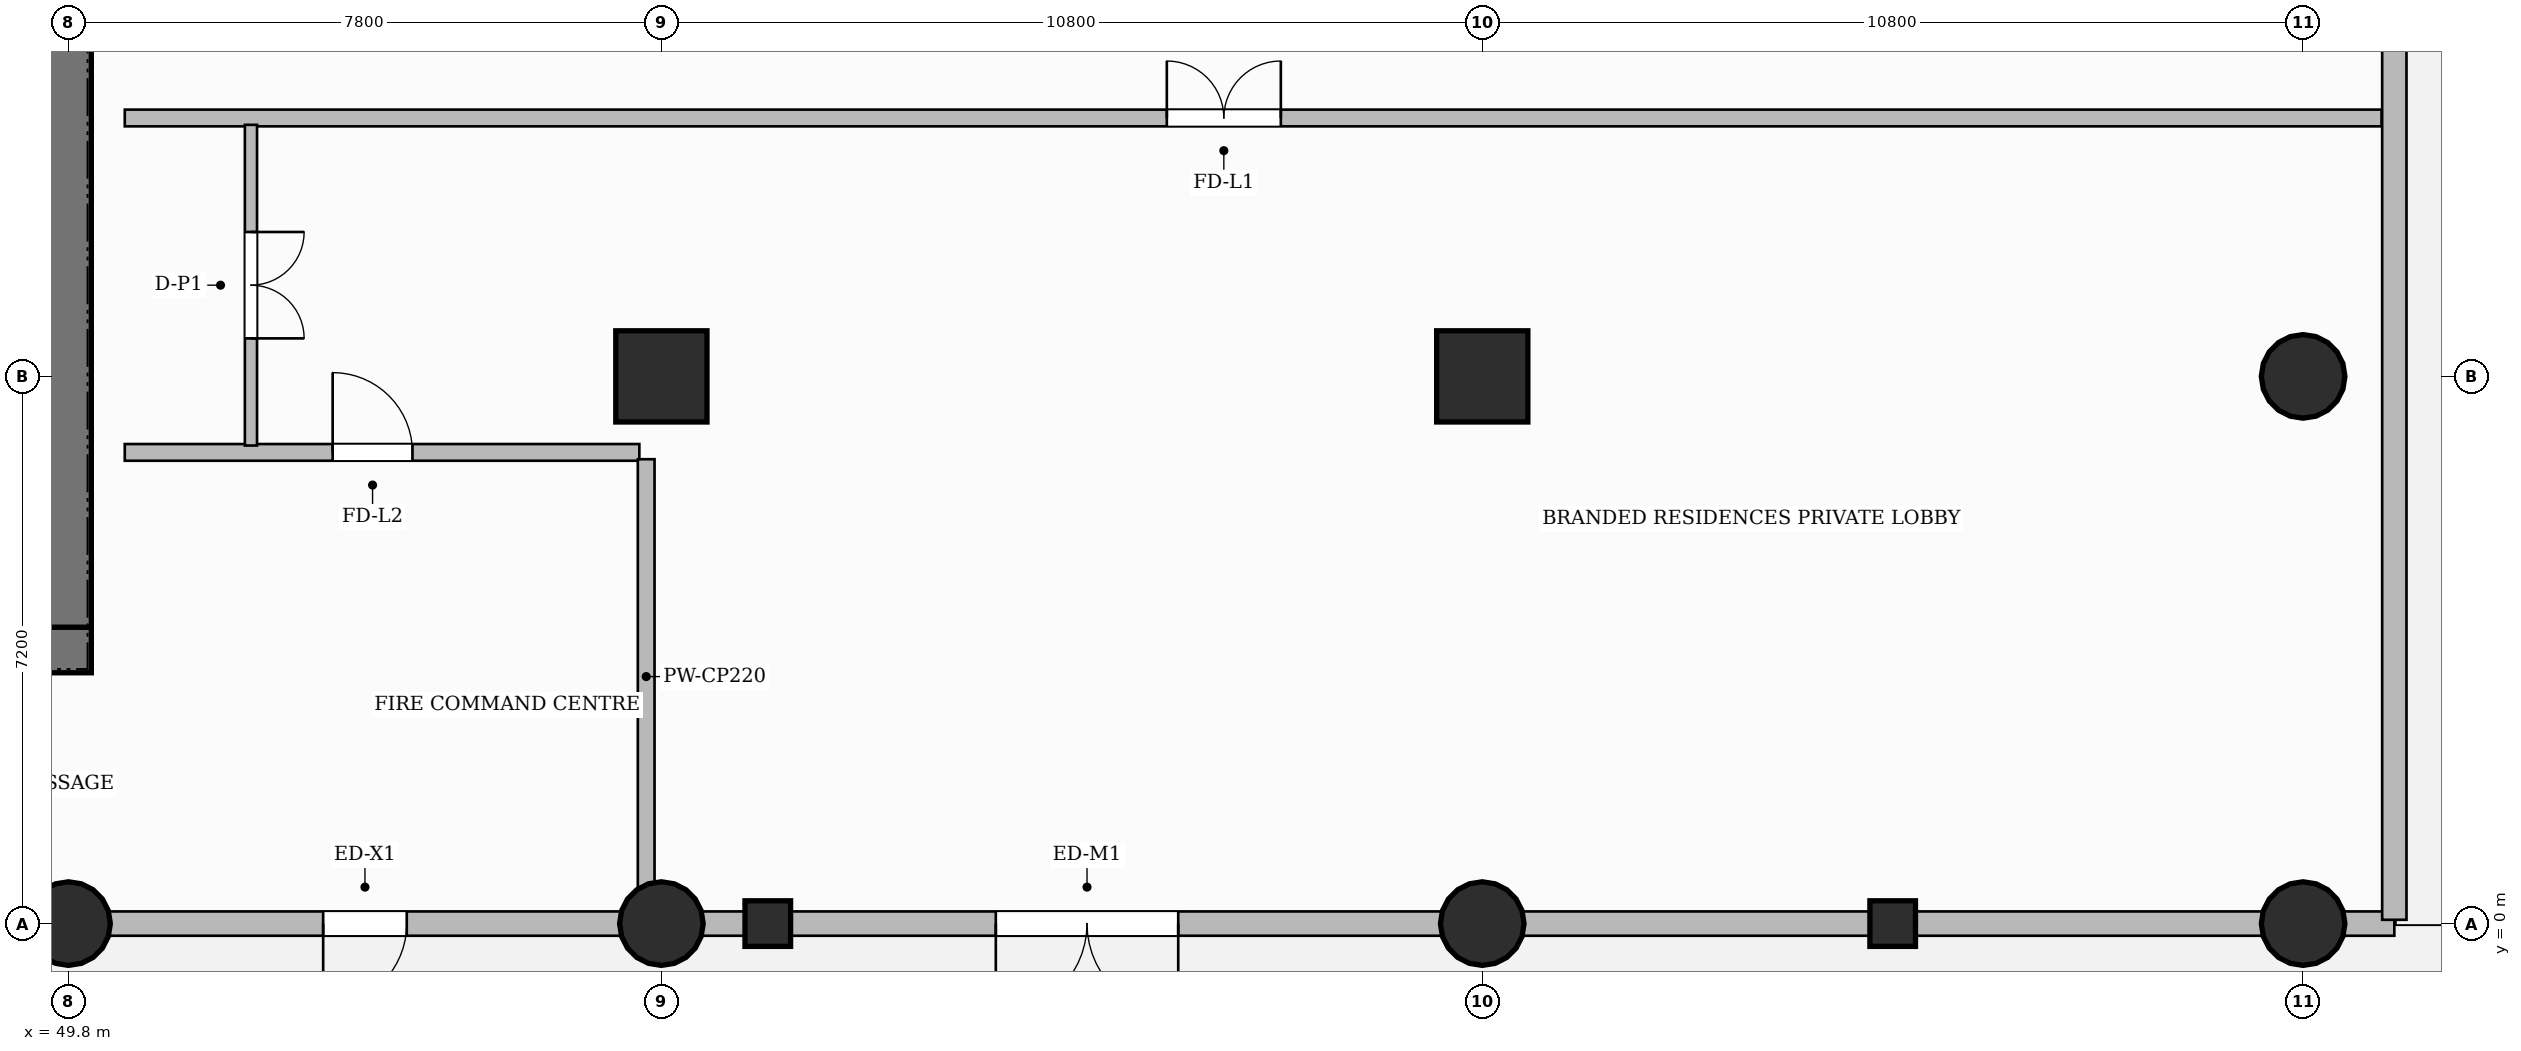
"""IFC4 building model, lengths in metres.
Left out: names, types, materials, properties, quantities, classifications, styles, units other than length and angle.
Written with IfcOpenShell. Run it as: python <this file> out.ifc"""

import sys

from ifc_helpers import new_model, si_unit, direction, frame, frame_2d, origin, origin_2d, place, context, subcontext, project, spatial, rectangle, circle, extrude, source, transform, mapped, element, fill, save


model = new_model("IFC4")
c1 = context("Model", 3, precision=1e-05, world=origin(), true_north=direction((0.0, 1.0)))
c2 = subcontext(c1, "Body", "Model", "MODEL_VIEW")
j1 = project(units=[si_unit("LENGTHUNIT", "METRE"), si_unit("PLANEANGLEUNIT", "RADIAN")], contexts=[c1])
p1 = place(None, origin())
s1 = spatial("IfcSite", under=j1, at=p1, CompositionType="ELEMENT")
p2 = place(p1, origin())
s2 = spatial("IfcBuilding", under=s1, at=p2, CompositionType="ELEMENT")
p3 = place(p2, origin())
s3 = spatial("IfcBuildingStorey", under=s2, at=p3, CompositionType="ELEMENT", Elevation=0.0)
p4 = place(p3, frame((34.5, 3.6, 0.0), z_axis=(0.0, 0.0, 1.0), x_axis=(1.0, 0.0, 0.0)))
e1 = element("IfcWall", 1, at=p4, inside=s3, PredefinedType="SHEAR", context=c2, shape_type="SweptSolid", body=[
    extrude(rectangle(XDim=15.6, YDim=0.6, at=frame_2d((7.8, 0.0))), origin(), (0.0, 0.0, 1.0), 5.4),
])
p5 = place(p4, frame((4.77, 0.0, 0.0)))
e2 = element("IfcOpeningElement", 2, at=p5, cuts=e1, PredefinedType="OPENING", context=c2, shape_type="SweptSolid", body=[
    extrude(rectangle(XDim=0.9, YDim=2.1, at=frame_2d((0.45, 1.05))), frame((0.0, 0.31, 0.0), z_axis=(0.0, -1.0, 0.0), x_axis=(1.0, 0.0, 0.0)), (0.0, 0.0, 1.0), 0.62),
])
p6 = place(p4, frame((7.15, 0.0, 0.0)))
e3 = element("IfcOpeningElement", 3, at=p6, cuts=e1, PredefinedType="OPENING", context=c2, shape_type="SweptSolid", body=[
    extrude(rectangle(XDim=0.9, YDim=2.1, at=frame_2d((0.45, 1.05))), frame((0.0, 0.31, 0.0), z_axis=(0.0, -1.0, 0.0), x_axis=(1.0, 0.0, 0.0)), (0.0, 0.0, 1.0), 0.62),
])
p7 = place(p3, frame((49.8, 3.9, 0.0), z_axis=(0.0, 0.0, 1.0), x_axis=(0.0, 1.0, 0.0)))
e4 = element("IfcWall", 4, at=p7, inside=s3, PredefinedType="SHEAR", context=c2, shape_type="SweptSolid", body=[
    extrude(rectangle(XDim=10.2, YDim=0.6, at=frame_2d((5.1, 0.0))), origin(), (0.0, 0.0, 1.0), 5.4),
])
p8 = place(p7, frame((8.225, 0.0, 0.0)))
e5 = element("IfcOpeningElement", 5, at=p8, cuts=e4, PredefinedType="OPENING", context=c2, shape_type="SweptSolid", body=[
    extrude(rectangle(XDim=1.05, YDim=2.2, at=frame_2d((0.525, 1.1))), frame((0.0, 0.31, 0.0), z_axis=(0.0, -1.0, 0.0), x_axis=(1.0, 0.0, 0.0)), (0.0, 0.0, 1.0), 0.62),
])
m1 = source(origin(), c2, "Body", "SweptSolid", [
    extrude(circle(Radius=0.55, at=origin_2d()), origin(), (0.0, 0.0, 1.0), 5.4),
])
for number, where, z_axis, x_axis in (
    (6, (49.8, 0.0, 0.0), (0.0, 0.0, 1.0), (1.0, 0.0, 0.0)),
    (7, (57.6, 0.0, 0.0), (0.0, 0.0, 1.0), (1.0, 0.0, 0.0)),
):
    element("IfcColumn", number, at=place(p3, frame(where, z_axis=z_axis, x_axis=x_axis)), inside=s3, PredefinedType="COLUMN", context=c2, shape_type="MappedRepresentation", body=[
        mapped(m1, transform((0.0, 0.0, 0.0), scale=1.0)),
    ])
m2 = source(origin(), c2, "Body", "SweptSolid", [
    extrude(rectangle(XDim=1.2, YDim=1.2, at=origin_2d()), origin(), (0.0, 0.0, 1.0), 5.4),
])
p9 = place(p3, frame((57.6, 7.2, 0.0), z_axis=(0.0, 0.0, 1.0), x_axis=(1.0, 0.0, 0.0)))
e8 = element("IfcColumn", 8, at=p9, inside=s3, PredefinedType="COLUMN", context=c2, shape_type="MappedRepresentation", body=[
    mapped(m2, transform((0.0, 0.0, 0.0), scale=1.0)),
])
p10 = place(p3, frame((68.4, 0.0, 0.0), z_axis=(0.0, 0.0, 1.0), x_axis=(1.0, 0.0, 0.0)))
e9 = element("IfcColumn", 9, at=p10, inside=s3, PredefinedType="COLUMN", context=c2, shape_type="MappedRepresentation", body=[
    mapped(m1, transform((0.0, 0.0, 0.0), scale=1.0)),
])
p11 = place(p3, frame((68.4, 7.2, 0.0), z_axis=(0.0, 0.0, 1.0), x_axis=(1.0, 0.0, 0.0)))
e10 = element("IfcColumn", 10, at=p11, inside=s3, PredefinedType="COLUMN", context=c2, shape_type="MappedRepresentation", body=[
    mapped(m2, transform((0.0, 0.0, 0.0), scale=1.0)),
])
for number, where, z_axis, x_axis in (
    (11, (79.2, 0.0, 0.0), (0.0, 0.0, 1.0), (1.0, 0.0, 0.0)),
    (12, (79.2, 7.2, 0.0), (0.0, 0.0, 1.0), (1.0, 0.0, 0.0)),
):
    element("IfcColumn", number, at=place(p3, frame(where, z_axis=z_axis, x_axis=x_axis)), inside=s3, PredefinedType="COLUMN", context=c2, shape_type="MappedRepresentation", body=[
        mapped(m1, transform((0.0, 0.0, 0.0), scale=1.0)),
    ])
m3 = source(origin(), c2, "Body", "SweptSolid", [
    extrude(rectangle(XDim=0.6, YDim=0.6, at=origin_2d()), origin(), (0.0, 0.0, 1.0), 5.4),
])
for number, where, z_axis, x_axis in (
    (13, (59.0, 0.0, 0.0), (0.0, 0.0, 1.0), (1.0, 0.0, 0.0)),
    (14, (73.8, 0.0, 0.0), (0.0, 0.0, 1.0), (1.0, 0.0, 0.0)),
):
    element("IfcColumn", number, at=place(p3, frame(where, z_axis=z_axis, x_axis=x_axis)), inside=s3, PredefinedType="PILASTER", context=c2, shape_type="MappedRepresentation", body=[
        mapped(m3, transform((0.0, 0.0, 0.0), scale=1.0)),
    ])
p12 = place(p3, frame((50.54, 10.6, 0.0), z_axis=(0.0, 0.0, 1.0), x_axis=(1.0, 0.0, 0.0)))
e15 = element("IfcWall", 15, at=p12, inside=s3, PredefinedType="PARTITIONING", context=c2, shape_type="SweptSolid", body=[
    extrude(rectangle(XDim=29.692, YDim=0.22, at=frame_2d((14.846, 0.0))), origin(), (0.0, 0.0, 1.0), 5.1),
])
p13 = place(p12, frame((13.71, 0.0, 0.0)))
e16 = element("IfcOpeningElement", 16, at=p13, cuts=e15, PredefinedType="OPENING", context=c2, shape_type="SweptSolid", body=[
    extrude(rectangle(XDim=1.5, YDim=2.2, at=frame_2d((0.75, 1.1))), frame((0.0, 0.12, 0.0), z_axis=(0.0, -1.0, 0.0), x_axis=(1.0, 0.0, 0.0)), (0.0, 0.0, 1.0), 0.24),
])
p14 = place(p3, frame((50.54, 6.2, 0.0), z_axis=(0.0, 0.0, 1.0), x_axis=(1.0, 0.0, 0.0)))
e17 = element("IfcWall", 17, at=p14, inside=s3, PredefinedType="PARTITIONING", context=c2, shape_type="SweptSolid", body=[
    extrude(rectangle(XDim=6.77, YDim=0.22, at=frame_2d((3.385, 0.0))), origin(), (0.0, 0.0, 1.0), 5.1),
])
p15 = place(p14, frame((2.735, 0.0, 0.0)))
e18 = element("IfcOpeningElement", 18, at=p15, cuts=e17, PredefinedType="OPENING", context=c2, shape_type="SweptSolid", body=[
    extrude(rectangle(XDim=1.05, YDim=2.15, at=frame_2d((0.525, 1.075))), frame((0.0, 0.12, 0.0), z_axis=(0.0, -1.0, 0.0), x_axis=(1.0, 0.0, 0.0)), (0.0, 0.0, 1.0), 0.24),
])
p16 = place(p3, frame((57.4, 0.39, 0.0), z_axis=(0.0, 0.0, 1.0), x_axis=(0.0, 1.0, 0.0)))
e19 = element("IfcWall", 19, at=p16, inside=s3, PredefinedType="PARTITIONING", context=c2, shape_type="SweptSolid", body=[
    extrude(rectangle(XDim=5.72, YDim=0.22, at=frame_2d((2.86, 0.0))), origin(), (0.0, 0.0, 1.0), 4.085),
])
p17 = place(p3, frame((52.2, 10.51, 0.0), z_axis=(0.0, 0.0, 1.0), x_axis=(0.0, -1.0, 0.0)))
e20 = element("IfcWall", 20, at=p17, inside=s3, PredefinedType="PARTITIONING", context=c2, shape_type="SweptSolid", body=[
    extrude(rectangle(XDim=4.22, YDim=0.16, at=frame_2d((2.11, 0.0))), origin(), (0.0, 0.0, 1.0), 5.1),
])
p18 = place(p17, frame((1.41, 0.0, 0.0)))
e21 = element("IfcOpeningElement", 21, at=p18, cuts=e20, PredefinedType="OPENING", context=c2, shape_type="SweptSolid", body=[
    extrude(rectangle(XDim=1.4, YDim=2.35, at=frame_2d((0.7, 1.175))), frame((0.0, 0.09, 0.0), z_axis=(0.0, -1.0, 0.0), x_axis=(1.0, 0.0, 0.0)), (0.0, 0.0, 1.0), 0.18),
])
p19 = place(p3, frame((28.35, 0.0, 0.0), z_axis=(0.0, 0.0, 1.0), x_axis=(1.0, 0.0, 0.0)))
e22 = element("IfcWall", 22, at=p19, inside=s3, PredefinedType="SOLIDWALL", context=c2, shape_type="SweptSolid", body=[
    extrude(rectangle(XDim=52.05, YDim=0.32, at=frame_2d((26.025, 0.0))), origin(), (0.0, 0.0, 1.0), 4.085),
])
p20 = place(p19, frame((24.8, 0.0, 0.0)))
e23 = element("IfcOpeningElement", 23, at=p20, cuts=e22, PredefinedType="OPENING", context=c2, shape_type="SweptSolid", body=[
    extrude(rectangle(XDim=1.1, YDim=2.2, at=frame_2d((0.55, 1.1))), frame((0.0, 0.17, 0.0), z_axis=(0.0, -1.0, 0.0), x_axis=(1.0, 0.0, 0.0)), (0.0, 0.0, 1.0), 0.34),
])
p21 = place(p19, frame((33.65, 0.0, 0.0)))
e24 = element("IfcOpeningElement", 24, at=p21, cuts=e22, PredefinedType="OPENING", context=c2, shape_type="SweptSolid", body=[
    extrude(rectangle(XDim=2.4, YDim=2.8, at=frame_2d((1.2, 1.4))), frame((0.0, 0.17, 0.0), z_axis=(0.0, -1.0, 0.0), x_axis=(1.0, 0.0, 0.0)), (0.0, 0.0, 1.0), 0.34),
])
p22 = place(p3, frame((80.4, 0.05, 0.0), z_axis=(0.0, 0.0, 1.0), x_axis=(0.0, 1.0, 0.0)))
e25 = element("IfcWall", 25, at=p22, inside=s3, PredefinedType="SOLIDWALL", context=c2, shape_type="SweptSolid", body=[
    extrude(rectangle(XDim=46.7, YDim=0.32, at=frame_2d((23.35, 0.0))), origin(), (0.0, 0.0, 1.0), 5.1),
])
p23 = place(p22, frame((11.5, 0.0, 0.0)))
e26 = element("IfcOpeningElement", 26, at=p23, cuts=e25, PredefinedType="OPENING", context=c2, shape_type="SweptSolid", body=[
    extrude(rectangle(XDim=1.8, YDim=2.4, at=frame_2d((0.9, 1.2))), frame((0.0, 0.17, 0.0), z_axis=(0.0, -1.0, 0.0), x_axis=(1.0, 0.0, 0.0)), (0.0, 0.0, 1.0), 0.34),
])
p24 = place(p22, frame((16.75, 0.0, 0.0)))
e27 = element("IfcOpeningElement", 27, at=p24, cuts=e25, PredefinedType="OPENING", context=c2, shape_type="SweptSolid", body=[
    extrude(rectangle(XDim=2.4, YDim=2.8, at=frame_2d((1.2, 1.4))), frame((0.0, 0.17, 0.0), z_axis=(0.0, -1.0, 0.0), x_axis=(1.0, 0.0, 0.0)), (0.0, 0.0, 1.0), 0.34),
])
p25 = place(p22, frame((42.25, 0.0, 0.0)))
e28 = element("IfcOpeningElement", 28, at=p25, cuts=e25, PredefinedType="OPENING", context=c2, shape_type="SweptSolid", body=[
    extrude(rectangle(XDim=1.8, YDim=2.4, at=frame_2d((0.9, 1.2))), frame((0.0, 0.17, 0.0), z_axis=(0.0, -1.0, 0.0), x_axis=(1.0, 0.0, 0.0)), (0.0, 0.0, 1.0), 0.34),
])
m4 = source(origin(), c2, "Body", "SweptSolid", [
    extrude(rectangle(XDim=1.5, YDim=2.2, at=frame_2d((0.75, 1.1))), frame((0.0, 0.025, 0.0), z_axis=(0.0, -1.0, 0.0), x_axis=(1.0, 0.0, 0.0)), (0.0, 0.0, 1.0), 0.05),
])
p26 = place(p13, origin())
e29 = element("IfcDoor", 29, at=p26, inside=s3, OperationType="DOUBLE_DOOR_SINGLE_SWING", PredefinedType="DOOR", context=c2, shape_type="MappedRepresentation", body=[
    mapped(m4, transform((0.0, 0.0, 0.0), scale=1.0)),
])
fill(e16, e29)
m5 = source(origin(), c2, "Body", "SweptSolid", [
    extrude(rectangle(XDim=1.05, YDim=2.15, at=frame_2d((0.525, 1.075))), frame((0.0, 0.025, 0.0), z_axis=(0.0, -1.0, 0.0), x_axis=(1.0, 0.0, 0.0)), (0.0, 0.0, 1.0), 0.05),
])
p27 = place(p15, origin())
e30 = element("IfcDoor", 30, at=p27, inside=s3, OperationType="SINGLE_SWING_LEFT", PredefinedType="DOOR", context=c2, shape_type="MappedRepresentation", body=[
    mapped(m5, transform((0.0, 0.0, 0.0), scale=1.0)),
])
fill(e18, e30)
m6 = source(origin(), c2, "Body", "SweptSolid", [
    extrude(rectangle(XDim=1.4, YDim=2.35, at=frame_2d((0.7, 1.175))), frame((0.0, 0.025, 0.0), z_axis=(0.0, -1.0, 0.0), x_axis=(1.0, 0.0, 0.0)), (0.0, 0.0, 1.0), 0.05),
])
p28 = place(p18, origin())
e31 = element("IfcDoor", 31, at=p28, inside=s3, OperationType="DOUBLE_DOOR_SINGLE_SWING", PredefinedType="DOOR", context=c2, shape_type="MappedRepresentation", body=[
    mapped(m6, transform((0.0, 0.0, 0.0), scale=1.0)),
])
fill(e21, e31)
m7 = source(origin(), c2, "Body", "SweptSolid", [
    extrude(rectangle(XDim=1.1, YDim=2.2, at=frame_2d((0.55, 1.1))), frame((0.0, 0.025, 0.0), z_axis=(0.0, -1.0, 0.0), x_axis=(1.0, 0.0, 0.0)), (0.0, 0.0, 1.0), 0.05),
])
p29 = place(p20, frame((1.1, 0.0, 0.0), z_axis=(0.0, 0.0, 1.0), x_axis=(-1.0, 0.0, 0.0)))
e32 = element("IfcDoor", 32, at=p29, inside=s3, OperationType="SINGLE_SWING_LEFT", PredefinedType="DOOR", context=c2, shape_type="MappedRepresentation", body=[
    mapped(m7, transform((0.0, 0.0, 0.0), scale=1.0)),
])
fill(e23, e32)
m8 = source(origin(), c2, "Body", "SweptSolid", [
    extrude(rectangle(XDim=2.4, YDim=2.8, at=frame_2d((1.2, 1.4))), frame((0.0, 0.025, 0.0), z_axis=(0.0, -1.0, 0.0), x_axis=(1.0, 0.0, 0.0)), (0.0, 0.0, 1.0), 0.05),
])
p30 = place(p21, frame((2.4, 0.0, 0.0), z_axis=(0.0, 0.0, 1.0), x_axis=(-1.0, 0.0, 0.0)))
e33 = element("IfcDoor", 33, at=p30, inside=s3, OperationType="DOUBLE_DOOR_SINGLE_SWING", PredefinedType="DOOR", context=c2, shape_type="MappedRepresentation", body=[
    mapped(m8, transform((0.0, 0.0, 0.0), scale=1.0)),
])
fill(e24, e33)
save(model, sys.argv[1])
